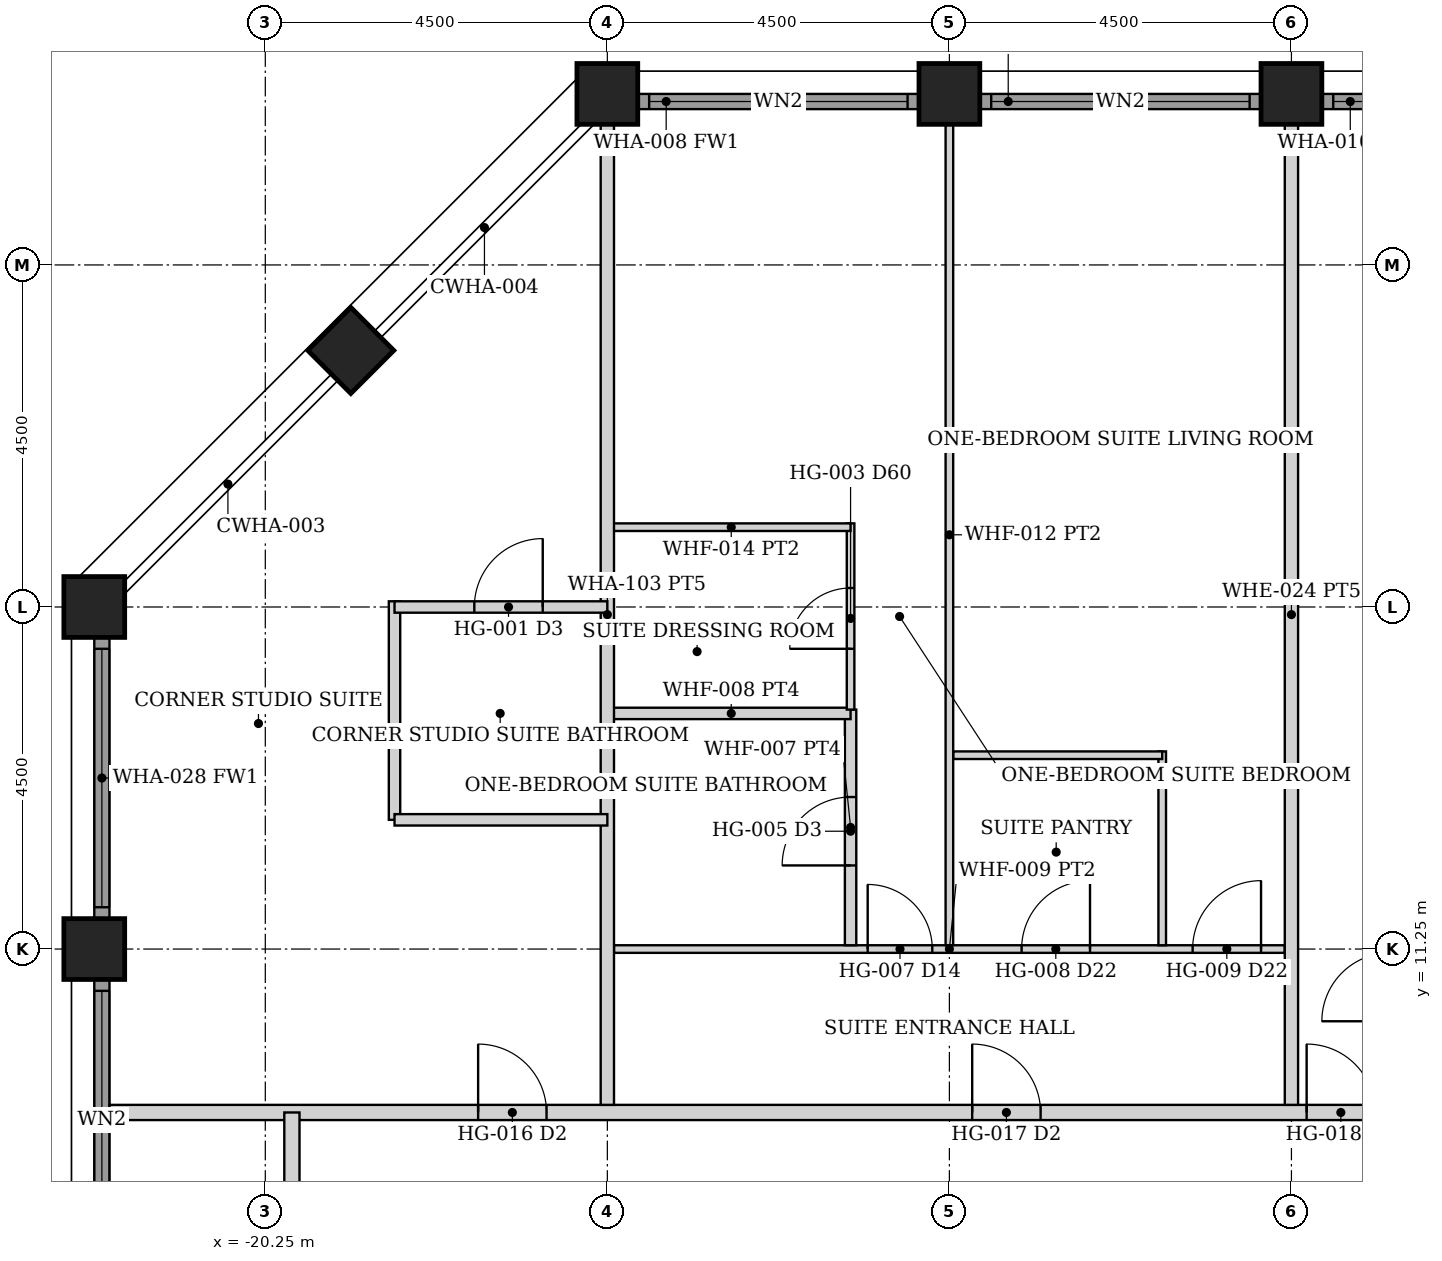
"""IFC4 building model, lengths in metres.
Left out: names, types, materials, properties, quantities, classifications, styles, units other than length and angle.
Written with IfcOpenShell. Run it as: python <this file> out.ifc"""

import sys

from ifc_helpers import new_model, si_unit, direction, frame, frame_2d, origin, origin_2d, place, context, subcontext, project, spatial, rectangle, hollow_rectangle, extrude, element, fill, save


model = new_model("IFC4")
c1 = context("Model", 3, precision=1e-05, world=origin(), true_north=direction((0.0, 1.0)))
c2 = subcontext(c1, "Body", "Model", "MODEL_VIEW")
j1 = project(units=[si_unit("LENGTHUNIT", "METRE"), si_unit("PLANEANGLEUNIT", "RADIAN")], contexts=[c1])
p1 = place(None, origin())
s1 = spatial("IfcSite", under=j1, at=p1, CompositionType="ELEMENT")
p2 = place(p1, origin())
s2 = spatial("IfcBuilding", under=s1, at=p2, CompositionType="ELEMENT")
p3 = place(p2, frame((0.0, 0.0, 183.2)))
s3 = spatial("IfcBuildingStorey", under=s2, at=p3, CompositionType="ELEMENT", Elevation=183.2)
for number, where, z_axis, x_axis in (
    (1, (-15.75, 22.5, 0.0), (0.0, 0.0, 1.0), (0.0, 1.0, 0.0)),
    (2, (-11.25, 22.5, 0.0), (0.0, 0.0, 1.0), (0.0, 1.0, 0.0)),
    (3, (-6.75, 22.5, 0.0), (0.0, 0.0, 1.0), (0.0, 1.0, 0.0)),
    (4, (-22.5, 11.25, 0.0), (0.0, 0.0, 1.0), (1.0, 0.0, 0.0)),
    (5, (-22.5, 15.75, 0.0), (0.0, 0.0, 1.0), (1.0, 0.0, 0.0)),
    (6, (-19.125, 19.125, 0.0), (0.0, 0.0, 1.0), (0.707, -0.707, 0.0)),
):
    element("IfcColumn", number, at=place(p3, frame(where, z_axis=z_axis, x_axis=x_axis)), inside=s3, PredefinedType="COLUMN", context=c2, shape_type="SweptSolid", body=[
        extrude(hollow_rectangle(XDim=0.8, YDim=0.8, WallThickness=0.045, at=origin_2d()), origin(), (0.0, 0.0, 1.0), 3.6),
    ])
p4 = place(p3, frame((-15.345, 22.4, 0.0), z_axis=(0.0, 0.0, 1.0), x_axis=(1.0, 0.0, 0.0)))
e7 = element("IfcWall", 7, at=p4, inside=s3, PredefinedType="SOLIDWALL", context=c2, shape_type="SweptSolid", body=[
    extrude(rectangle(XDim=3.69, YDim=0.2, at=frame_2d((1.845, 0.0))), origin(), (0.0, 0.0, 1.0), 2.479),
])
p5 = place(p4, frame((0.145, 0.0, 0.3)))
e8 = element("IfcOpeningElement", 8, at=p5, cuts=e7, PredefinedType="OPENING", context=c2, shape_type="SweptSolid", body=[
    extrude(rectangle(XDim=3.4, YDim=2.029, at=frame_2d((1.7, 1.015))), frame((0.0, 0.11, 0.0), z_axis=(0.0, -1.0, 0.0), x_axis=(1.0, 0.0, 0.0)), (0.0, 0.0, 1.0), 0.22),
])
p6 = place(p3, frame((-10.845, 22.4, 0.0), z_axis=(0.0, 0.0, 1.0), x_axis=(1.0, 0.0, 0.0)))
e9 = element("IfcWall", 9, at=p6, inside=s3, PredefinedType="SOLIDWALL", context=c2, shape_type="SweptSolid", body=[
    extrude(rectangle(XDim=3.69, YDim=0.2, at=frame_2d((1.845, 0.0))), origin(), (0.0, 0.0, 1.0), 2.479),
])
p7 = place(p6, frame((0.145, 0.0, 0.3)))
e10 = element("IfcOpeningElement", 10, at=p7, cuts=e9, PredefinedType="OPENING", context=c2, shape_type="SweptSolid", body=[
    extrude(rectangle(XDim=3.4, YDim=2.029, at=frame_2d((1.7, 1.015))), frame((0.0, 0.11, 0.0), z_axis=(0.0, -1.0, 0.0), x_axis=(1.0, 0.0, 0.0)), (0.0, 0.0, 1.0), 0.22),
])
p8 = place(p3, frame((-6.345, 22.4, 0.0), z_axis=(0.0, 0.0, 1.0), x_axis=(1.0, 0.0, 0.0)))
e11 = element("IfcWall", 11, at=p8, inside=s3, PredefinedType="SOLIDWALL", context=c2, shape_type="SweptSolid", body=[
    extrude(rectangle(XDim=3.69, YDim=0.2, at=frame_2d((1.845, 0.0))), origin(), (0.0, 0.0, 1.0), 2.479),
])
p9 = place(p8, frame((0.145, 0.0, 0.3)))
e12 = element("IfcOpeningElement", 12, at=p9, cuts=e11, PredefinedType="OPENING", context=c2, shape_type="SweptSolid", body=[
    extrude(rectangle(XDim=3.4, YDim=2.029, at=frame_2d((1.7, 1.015))), frame((0.0, 0.11, 0.0), z_axis=(0.0, -1.0, 0.0), x_axis=(1.0, 0.0, 0.0)), (0.0, 0.0, 1.0), 0.22),
])
p10 = place(p3, frame((-22.4, 7.155, 0.0), z_axis=(0.0, 0.0, 1.0), x_axis=(0.0, 1.0, 0.0)))
e13 = element("IfcWall", 13, at=p10, inside=s3, PredefinedType="SOLIDWALL", context=c2, shape_type="SweptSolid", body=[
    extrude(rectangle(XDim=3.69, YDim=0.2, at=frame_2d((1.845, 0.0))), origin(), (0.0, 0.0, 1.0), 2.479),
])
p11 = place(p10, frame((0.145, 0.0, 0.3)))
e14 = element("IfcOpeningElement", 14, at=p11, cuts=e13, PredefinedType="OPENING", context=c2, shape_type="SweptSolid", body=[
    extrude(rectangle(XDim=3.4, YDim=2.029, at=frame_2d((1.7, 1.015))), frame((0.0, 0.11, 0.0), z_axis=(0.0, -1.0, 0.0), x_axis=(1.0, 0.0, 0.0)), (0.0, 0.0, 1.0), 0.22),
])
p12 = place(p3, frame((-22.4, 11.655, 0.0), z_axis=(0.0, 0.0, 1.0), x_axis=(0.0, 1.0, 0.0)))
e15 = element("IfcWall", 15, at=p12, inside=s3, PredefinedType="SOLIDWALL", context=c2, shape_type="SweptSolid", body=[
    extrude(rectangle(XDim=3.69, YDim=0.2, at=frame_2d((1.845, 0.0))), origin(), (0.0, 0.0, 1.0), 2.479),
])
p13 = place(p12, frame((0.145, 0.0, 0.3)))
e16 = element("IfcOpeningElement", 16, at=p13, cuts=e15, PredefinedType="OPENING", context=c2, shape_type="SweptSolid", body=[
    extrude(rectangle(XDim=3.4, YDim=2.029, at=frame_2d((1.7, 1.015))), frame((0.0, 0.11, 0.0), z_axis=(0.0, -1.0, 0.0), x_axis=(1.0, 0.0, 0.0)), (0.0, 0.0, 1.0), 0.22),
])
p14 = place(p3, frame((-22.3, 9.1, 0.0), z_axis=(0.0, 0.0, 1.0), x_axis=(1.0, 0.0, 0.0)))
e17 = element("IfcWall", 17, at=p14, inside=s3, PredefinedType="PARTITIONING", context=c2, shape_type="SweptSolid", body=[
    extrude(rectangle(XDim=44.6, YDim=0.2, at=frame_2d((22.3, 0.0))), origin(), (0.0, 0.0, 1.0), 2.473),
])
p15 = place(p14, frame((11.35, 0.0, 0.0)))
e18 = element("IfcOpeningElement", 18, at=p15, cuts=e17, PredefinedType="OPENING", context=c2, shape_type="SweptSolid", body=[
    extrude(rectangle(XDim=0.9, YDim=2.1, at=frame_2d((0.45, 1.05))), frame((0.0, 0.11, 0.0), z_axis=(0.0, -1.0, 0.0), x_axis=(1.0, 0.0, 0.0)), (0.0, 0.0, 1.0), 0.22),
])
p16 = place(p14, frame((15.75, 0.0, 0.0)))
e19 = element("IfcOpeningElement", 19, at=p16, cuts=e17, PredefinedType="OPENING", context=c2, shape_type="SweptSolid", body=[
    extrude(rectangle(XDim=0.9, YDim=2.1, at=frame_2d((0.45, 1.05))), frame((0.0, 0.11, 0.0), z_axis=(0.0, -1.0, 0.0), x_axis=(1.0, 0.0, 0.0)), (0.0, 0.0, 1.0), 0.22),
])
p17 = place(p14, frame((23.45, 0.0, 0.0)))
e20 = element("IfcOpeningElement", 20, at=p17, cuts=e17, PredefinedType="OPENING", context=c2, shape_type="SweptSolid", body=[
    extrude(rectangle(XDim=0.9, YDim=2.1, at=frame_2d((0.45, 1.05))), frame((0.0, 0.11, 0.0), z_axis=(0.0, -1.0, 0.0), x_axis=(1.0, 0.0, 0.0)), (0.0, 0.0, 1.0), 0.22),
])
p18 = place(p14, frame((24.75, 0.0, 0.0)))
e21 = element("IfcOpeningElement", 21, at=p18, cuts=e17, PredefinedType="OPENING", context=c2, shape_type="SweptSolid", body=[
    extrude(rectangle(XDim=0.9, YDim=2.1, at=frame_2d((0.45, 1.05))), frame((0.0, 0.11, 0.0), z_axis=(0.0, -1.0, 0.0), x_axis=(1.0, 0.0, 0.0)), (0.0, 0.0, 1.0), 0.22),
])
p19 = place(p14, frame((29.35, 0.0, 0.0)))
e22 = element("IfcOpeningElement", 22, at=p19, cuts=e17, PredefinedType="OPENING", context=c2, shape_type="SweptSolid", body=[
    extrude(rectangle(XDim=0.9, YDim=2.1, at=frame_2d((0.45, 1.05))), frame((0.0, 0.11, 0.0), z_axis=(0.0, -1.0, 0.0), x_axis=(1.0, 0.0, 0.0)), (0.0, 0.0, 1.0), 0.22),
])
p20 = place(p14, frame((38.85, 0.0, 0.0)))
e23 = element("IfcOpeningElement", 23, at=p20, cuts=e17, PredefinedType="OPENING", context=c2, shape_type="SweptSolid", body=[
    extrude(rectangle(XDim=0.9, YDim=2.1, at=frame_2d((0.45, 1.05))), frame((0.0, 0.11, 0.0), z_axis=(0.0, -1.0, 0.0), x_axis=(1.0, 0.0, 0.0)), (0.0, 0.0, 1.0), 0.22),
])
p21 = place(p14, frame((4.85, 0.0, 0.0)))
e24 = element("IfcOpeningElement", 24, at=p21, cuts=e17, PredefinedType="OPENING", context=c2, shape_type="SweptSolid", body=[
    extrude(rectangle(XDim=0.9, YDim=2.1, at=frame_2d((0.45, 1.05))), frame((0.0, 0.11, 0.0), z_axis=(0.0, -1.0, 0.0), x_axis=(1.0, 0.0, 0.0)), (0.0, 0.0, 1.0), 0.22),
])
p22 = place(p3, frame((-19.9, -9.1, 0.0), z_axis=(0.0, 0.0, 1.0), x_axis=(0.0, 1.0, 0.0)))
e25 = element("IfcWall", 25, at=p22, inside=s3, PredefinedType="PARTITIONING", context=c2, shape_type="SweptSolid", body=[
    extrude(rectangle(XDim=18.2, YDim=0.2, at=frame_2d((9.1, 0.0))), origin(), (0.0, 0.0, 1.0), 2.473),
])
p23 = place(p22, frame((8.6, 0.0, 0.0)))
e26 = element("IfcOpeningElement", 26, at=p23, cuts=e25, PredefinedType="OPENING", context=c2, shape_type="SweptSolid", body=[
    extrude(rectangle(XDim=1.0, YDim=2.1, at=frame_2d((0.5, 1.05))), frame((0.0, 0.11, 0.0), z_axis=(0.0, -1.0, 0.0), x_axis=(1.0, 0.0, 0.0)), (0.0, 0.0, 1.0), 0.22),
])
p24 = place(p3, frame((-15.663, 11.25, 0.0), z_axis=(0.0, 0.0, 1.0), x_axis=(1.0, 0.0, 0.0)))
e27 = element("IfcWall", 27, at=p24, inside=s3, PredefinedType="PARTITIONING", context=c2, shape_type="SweptSolid", body=[
    extrude(rectangle(XDim=8.825, YDim=0.1, at=frame_2d((4.413, 0.0))), origin(), (0.0, 0.0, 1.0), 2.473),
])
p25 = place(p24, frame((5.363, 0.0, 0.0)))
e28 = element("IfcOpeningElement", 28, at=p25, cuts=e27, PredefinedType="OPENING", context=c2, shape_type="SweptSolid", body=[
    extrude(rectangle(XDim=0.9, YDim=2.1, at=frame_2d((0.45, 1.05))), frame((0.0, 0.06, 0.0), z_axis=(0.0, -1.0, 0.0), x_axis=(1.0, 0.0, 0.0)), (0.0, 0.0, 1.0), 0.12),
])
p26 = place(p24, frame((7.613, 0.0, 0.0)))
e29 = element("IfcOpeningElement", 29, at=p26, cuts=e27, PredefinedType="OPENING", context=c2, shape_type="SweptSolid", body=[
    extrude(rectangle(XDim=0.9, YDim=2.1, at=frame_2d((0.45, 1.05))), frame((0.0, 0.06, 0.0), z_axis=(0.0, -1.0, 0.0), x_axis=(1.0, 0.0, 0.0)), (0.0, 0.0, 1.0), 0.12),
])
p27 = place(p24, frame((3.337, 0.0, 0.0)))
e30 = element("IfcOpeningElement", 30, at=p27, cuts=e27, PredefinedType="OPENING", context=c2, shape_type="SweptSolid", body=[
    extrude(rectangle(XDim=0.85, YDim=2.1, at=frame_2d((0.425, 1.05))), frame((0.0, 0.06, 0.0), z_axis=(0.0, -1.0, 0.0), x_axis=(1.0, 0.0, 0.0)), (0.0, 0.0, 1.0), 0.12),
])
p28 = place(p3, frame((-8.45, 11.3, 0.0), z_axis=(0.0, 0.0, 1.0), x_axis=(0.0, 1.0, 0.0)))
e31 = element("IfcWall", 31, at=p28, inside=s3, PredefinedType="PARTITIONING", context=c2, shape_type="SweptSolid", body=[
    extrude(rectangle(XDim=2.55, YDim=0.1, at=frame_2d((1.275, 0.0))), origin(), (0.0, 0.0, 1.0), 2.473),
])
p29 = place(p3, frame((-11.2, 13.8, 0.0), z_axis=(0.0, 0.0, 1.0), x_axis=(1.0, 0.0, 0.0)))
e32 = element("IfcWall", 32, at=p29, inside=s3, PredefinedType="PARTITIONING", context=c2, shape_type="SweptSolid", body=[
    extrude(rectangle(XDim=2.75, YDim=0.1, at=frame_2d((1.375, 0.0))), origin(), (0.0, 0.0, 1.0), 2.473),
])
p30 = place(p3, frame((-11.25, 11.3, 0.0), z_axis=(0.0, 0.0, 1.0), x_axis=(0.0, 1.0, 0.0)))
e33 = element("IfcWall", 33, at=p30, inside=s3, PredefinedType="PARTITIONING", context=c2, shape_type="SweptSolid", body=[
    extrude(rectangle(XDim=10.8, YDim=0.1, at=frame_2d((5.4, 0.0))), origin(), (0.0, 0.0, 1.0), 2.473),
])
p31 = place(p3, frame((-12.55, 11.3, 0.0), z_axis=(0.0, 0.0, 1.0), x_axis=(0.0, 1.0, 0.0)))
e34 = element("IfcWall", 34, at=p31, inside=s3, PredefinedType="PARTITIONING", context=c2, shape_type="SweptSolid", body=[
    extrude(rectangle(XDim=3.1, YDim=0.15, at=frame_2d((1.55, 0.0))), origin(), (0.0, 0.0, 1.0), 2.473),
])
p32 = place(p31, frame((1.05, 0.0, 0.0)))
e35 = element("IfcOpeningElement", 35, at=p32, cuts=e34, PredefinedType="OPENING", context=c2, shape_type="SweptSolid", body=[
    extrude(rectangle(XDim=0.9, YDim=2.1, at=frame_2d((0.45, 1.05))), frame((0.0, 0.085, 0.0), z_axis=(0.0, -1.0, 0.0), x_axis=(1.0, 0.0, 0.0)), (0.0, 0.0, 1.0), 0.17),
])
p33 = place(p3, frame((-15.69, 14.35, 0.0), z_axis=(0.0, 0.0, 1.0), x_axis=(1.0, 0.0, 0.0)))
e36 = element("IfcWall", 36, at=p33, inside=s3, PredefinedType="PARTITIONING", context=c2, shape_type="SweptSolid", body=[
    extrude(rectangle(XDim=3.14, YDim=0.15, at=frame_2d((1.57, 0.0))), origin(), (0.0, 0.0, 1.0), 2.473),
])
p34 = place(p3, frame((-12.55, 14.4, 0.0), z_axis=(0.0, 0.0, 1.0), x_axis=(0.0, 1.0, 0.0)))
e37 = element("IfcWall", 37, at=p34, inside=s3, PredefinedType="PARTITIONING", context=c2, shape_type="SweptSolid", body=[
    extrude(rectangle(XDim=2.45, YDim=0.1, at=frame_2d((1.225, 0.0))), origin(), (0.0, 0.0, 1.0), 2.473),
])
p35 = place(p34, frame((0.8, 0.0, 0.0)))
e38 = element("IfcOpeningElement", 38, at=p35, cuts=e37, PredefinedType="OPENING", context=c2, shape_type="SweptSolid", body=[
    extrude(rectangle(XDim=0.8, YDim=2.1, at=frame_2d((0.4, 1.05))), frame((0.0, 0.06, 0.0), z_axis=(0.0, -1.0, 0.0), x_axis=(1.0, 0.0, 0.0)), (0.0, 0.0, 1.0), 0.12),
])
p36 = place(p3, frame((-15.69, 16.8, 0.0), z_axis=(0.0, 0.0, 1.0), x_axis=(1.0, 0.0, 0.0)))
e39 = element("IfcWall", 39, at=p36, inside=s3, PredefinedType="PARTITIONING", context=c2, shape_type="SweptSolid", body=[
    extrude(rectangle(XDim=3.14, YDim=0.1, at=frame_2d((1.57, 0.0))), origin(), (0.0, 0.0, 1.0), 2.473),
])
for number, where, z_axis, x_axis in (
    (40, (-15.75, 9.2, 0.0), (0.0, 0.0, 1.0), (0.0, 1.0, 0.0)),
    (41, (-6.75, 9.2, 0.0), (0.0, 0.0, 1.0), (0.0, 1.0, 0.0)),
):
    element("IfcWall", number, at=place(p3, frame(where, z_axis=z_axis, x_axis=x_axis)), inside=s3, PredefinedType="PARTITIONING", context=c2, shape_type="SweptSolid", body=[
        extrude(rectangle(XDim=12.9, YDim=0.175, at=frame_2d((6.45, 0.0))), origin(), (0.0, 0.0, 1.0), 2.473),
    ])
p37 = place(p3, frame((-18.55, 12.95, 0.0), z_axis=(0.0, 0.0, 1.0), x_axis=(0.0, 1.0, 0.0)))
e42 = element("IfcWall", 42, at=p37, inside=s3, PredefinedType="PARTITIONING", context=c2, shape_type="SweptSolid", body=[
    extrude(rectangle(XDim=2.875, YDim=0.15, at=frame_2d((1.438, 0.0))), origin(), (0.0, 0.0, 1.0), 2.473),
])
p38 = place(p3, frame((-18.55, 12.95, 0.0), z_axis=(0.0, 0.0, 1.0), x_axis=(1.0, 0.0, 0.0)))
e43 = element("IfcWall", 43, at=p38, inside=s3, PredefinedType="PARTITIONING", context=c2, shape_type="SweptSolid", body=[
    extrude(rectangle(XDim=2.8, YDim=0.15, at=frame_2d((1.4, 0.0))), origin(), (0.0, 0.0, 1.0), 2.473),
])
p39 = place(p3, frame((-18.55, 15.75, 0.0), z_axis=(0.0, 0.0, 1.0), x_axis=(1.0, 0.0, 0.0)))
e44 = element("IfcWall", 44, at=p39, inside=s3, PredefinedType="PARTITIONING", context=c2, shape_type="SweptSolid", body=[
    extrude(rectangle(XDim=2.8, YDim=0.15, at=frame_2d((1.4, 0.0))), origin(), (0.0, 0.0, 1.0), 2.473),
])
p40 = place(p39, frame((1.05, 0.0, 0.0)))
e45 = element("IfcOpeningElement", 45, at=p40, cuts=e44, PredefinedType="OPENING", context=c2, shape_type="SweptSolid", body=[
    extrude(rectangle(XDim=0.9, YDim=2.1, at=frame_2d((0.45, 1.05))), frame((0.0, 0.085, 0.0), z_axis=(0.0, -1.0, 0.0), x_axis=(1.0, 0.0, 0.0)), (0.0, 0.0, 1.0), 0.17),
])
p41 = place(p5, origin())
e46 = element("IfcWindow", 46, at=p41, inside=s3, PartitioningType="SINGLE_PANEL", PredefinedType="WINDOW", context=c2, shape_type="SweptSolid", body=[
    extrude(rectangle(XDim=3.4, YDim=2.029, at=frame_2d((1.7, 1.015))), frame((0.0, 0.03, 0.0), z_axis=(0.0, -1.0, 0.0), x_axis=(1.0, 0.0, 0.0)), (0.0, 0.0, 1.0), 0.06),
])
fill(e8, e46)
p42 = place(p7, origin())
e47 = element("IfcWindow", 47, at=p42, inside=s3, PartitioningType="SINGLE_PANEL", PredefinedType="WINDOW", context=c2, shape_type="SweptSolid", body=[
    extrude(rectangle(XDim=3.4, YDim=2.029, at=frame_2d((1.7, 1.015))), frame((0.0, 0.03, 0.0), z_axis=(0.0, -1.0, 0.0), x_axis=(1.0, 0.0, 0.0)), (0.0, 0.0, 1.0), 0.06),
])
fill(e10, e47)
p43 = place(p9, origin())
e48 = element("IfcWindow", 48, at=p43, inside=s3, PartitioningType="SINGLE_PANEL", PredefinedType="WINDOW", context=c2, shape_type="SweptSolid", body=[
    extrude(rectangle(XDim=3.4, YDim=2.029, at=frame_2d((1.7, 1.015))), frame((0.0, 0.03, 0.0), z_axis=(0.0, -1.0, 0.0), x_axis=(1.0, 0.0, 0.0)), (0.0, 0.0, 1.0), 0.06),
])
fill(e12, e48)
p44 = place(p11, origin())
e49 = element("IfcWindow", 49, at=p44, inside=s3, PartitioningType="SINGLE_PANEL", PredefinedType="WINDOW", context=c2, shape_type="SweptSolid", body=[
    extrude(rectangle(XDim=3.4, YDim=2.029, at=frame_2d((1.7, 1.015))), frame((0.0, 0.03, 0.0), z_axis=(0.0, -1.0, 0.0), x_axis=(1.0, 0.0, 0.0)), (0.0, 0.0, 1.0), 0.06),
])
fill(e14, e49)
p45 = place(p13, origin())
e50 = element("IfcWindow", 50, at=p45, inside=s3, PartitioningType="SINGLE_PANEL", PredefinedType="WINDOW", context=c2, shape_type="SweptSolid", body=[
    extrude(rectangle(XDim=3.4, YDim=2.029, at=frame_2d((1.7, 1.015))), frame((0.0, 0.03, 0.0), z_axis=(0.0, -1.0, 0.0), x_axis=(1.0, 0.0, 0.0)), (0.0, 0.0, 1.0), 0.06),
])
fill(e16, e50)
p46 = place(p15, origin())
e51 = element("IfcDoor", 51, at=p46, inside=s3, OperationType="SINGLE_SWING_LEFT", PredefinedType="DOOR", context=c2, shape_type="SweptSolid", body=[
    extrude(rectangle(XDim=0.9, YDim=2.1, at=frame_2d((0.45, 1.05))), frame((0.0, 0.025, 0.0), z_axis=(0.0, -1.0, 0.0), x_axis=(1.0, 0.0, 0.0)), (0.0, 0.0, 1.0), 0.05),
])
fill(e18, e51)
p47 = place(p25, origin())
e52 = element("IfcDoor", 52, at=p47, inside=s3, OperationType="SINGLE_SWING_RIGHT", PredefinedType="DOOR", context=c2, shape_type="SweptSolid", body=[
    extrude(rectangle(XDim=0.9, YDim=2.1, at=frame_2d((0.45, 1.05))), frame((0.0, 0.025, 0.0), z_axis=(0.0, -1.0, 0.0), x_axis=(1.0, 0.0, 0.0)), (0.0, 0.0, 1.0), 0.05),
])
fill(e28, e52)
p48 = place(p26, origin())
e53 = element("IfcDoor", 53, at=p48, inside=s3, OperationType="SINGLE_SWING_RIGHT", PredefinedType="DOOR", context=c2, shape_type="SweptSolid", body=[
    extrude(rectangle(XDim=0.9, YDim=2.1, at=frame_2d((0.45, 1.05))), frame((0.0, 0.025, 0.0), z_axis=(0.0, -1.0, 0.0), x_axis=(1.0, 0.0, 0.0)), (0.0, 0.0, 1.0), 0.05),
])
fill(e29, e53)
p49 = place(p27, origin())
e54 = element("IfcDoor", 54, at=p49, inside=s3, OperationType="SINGLE_SWING_LEFT", PredefinedType="DOOR", context=c2, shape_type="SweptSolid", body=[
    extrude(rectangle(XDim=0.85, YDim=2.1, at=frame_2d((0.425, 1.05))), frame((0.0, 0.025, 0.0), z_axis=(0.0, -1.0, 0.0), x_axis=(1.0, 0.0, 0.0)), (0.0, 0.0, 1.0), 0.05),
])
fill(e30, e54)
p50 = place(p32, origin())
e55 = element("IfcDoor", 55, at=p50, inside=s3, OperationType="SINGLE_SWING_LEFT", PredefinedType="DOOR", context=c2, shape_type="SweptSolid", body=[
    extrude(rectangle(XDim=0.9, YDim=2.1, at=frame_2d((0.45, 1.05))), frame((0.0, 0.025, 0.0), z_axis=(0.0, -1.0, 0.0), x_axis=(1.0, 0.0, 0.0)), (0.0, 0.0, 1.0), 0.05),
])
fill(e35, e55)
p51 = place(p35, origin())
e56 = element("IfcDoor", 56, at=p51, inside=s3, OperationType="SINGLE_SWING_LEFT", PredefinedType="DOOR", context=c2, shape_type="SweptSolid", body=[
    extrude(rectangle(XDim=0.8, YDim=2.1, at=frame_2d((0.4, 1.05))), frame((0.0, 0.025, 0.0), z_axis=(0.0, -1.0, 0.0), x_axis=(1.0, 0.0, 0.0)), (0.0, 0.0, 1.0), 0.05),
])
fill(e38, e56)
p52 = place(p16, origin())
e57 = element("IfcDoor", 57, at=p52, inside=s3, OperationType="SINGLE_SWING_LEFT", PredefinedType="DOOR", context=c2, shape_type="SweptSolid", body=[
    extrude(rectangle(XDim=0.9, YDim=2.1, at=frame_2d((0.45, 1.05))), frame((0.0, 0.025, 0.0), z_axis=(0.0, -1.0, 0.0), x_axis=(1.0, 0.0, 0.0)), (0.0, 0.0, 1.0), 0.05),
])
fill(e19, e57)
p53 = place(p21, origin())
e58 = element("IfcDoor", 58, at=p53, inside=s3, OperationType="SINGLE_SWING_LEFT", PredefinedType="DOOR", context=c2, shape_type="SweptSolid", body=[
    extrude(rectangle(XDim=0.9, YDim=2.1, at=frame_2d((0.45, 1.05))), frame((0.0, 0.025, 0.0), z_axis=(0.0, -1.0, 0.0), x_axis=(1.0, 0.0, 0.0)), (0.0, 0.0, 1.0), 0.05),
])
fill(e24, e58)
p54 = place(p40, origin())
e59 = element("IfcDoor", 59, at=p54, inside=s3, OperationType="SINGLE_SWING_RIGHT", PredefinedType="DOOR", context=c2, shape_type="SweptSolid", body=[
    extrude(rectangle(XDim=0.9, YDim=2.1, at=frame_2d((0.45, 1.05))), frame((0.0, 0.025, 0.0), z_axis=(0.0, -1.0, 0.0), x_axis=(1.0, 0.0, 0.0)), (0.0, 0.0, 1.0), 0.05),
])
fill(e45, e59)
save(model, sys.argv[1])
